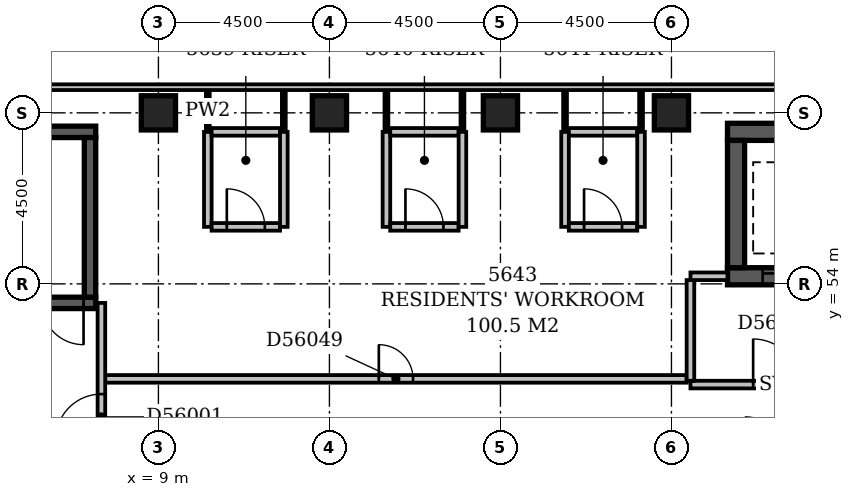
"""IFC4 building model, lengths in metres.
Left out: names, types, materials, properties, quantities, classifications, styles, units other than length and angle.
Written with IfcOpenShell. Run it as: python <this file> out.ifc"""

import sys

from ifc_helpers import new_model, si_unit, direction, frame, frame_2d, origin, origin_2d, place, context, subcontext, project, spatial, rectangle, extrude, element, fill, save


model = new_model("IFC4")
c1 = context("Model", 3, precision=1e-05, world=origin(), true_north=direction((0.0, 1.0)))
c2 = subcontext(c1, "Body", "Model", "MODEL_VIEW")
j1 = project(units=[si_unit("LENGTHUNIT", "METRE"), si_unit("PLANEANGLEUNIT", "RADIAN")], contexts=[c1])
p1 = place(None, origin())
s1 = spatial("IfcSite", under=j1, at=p1, CompositionType="ELEMENT")
p2 = place(p1, origin())
s2 = spatial("IfcBuilding", under=s1, at=p2, CompositionType="ELEMENT")
p3 = place(p2, frame((0.0, 0.0, 218.6)))
s3 = spatial("IfcBuildingStorey", under=s2, at=p3, CompositionType="ELEMENT", Elevation=218.6)
p4 = place(p3, frame((0.35, 53.5, -0.3), z_axis=(0.0, 0.0, 1.0), x_axis=(1.0, 0.0, 0.0)))
e1 = element("IfcWall", 1, at=p4, inside=s3, PredefinedType="SHEAR", context=c2, shape_type="SweptSolid", body=[
    extrude(rectangle(XDim=7.0, YDim=0.3, at=frame_2d((3.5, 0.0))), origin(), (0.0, 0.0, 1.0), 3.6),
])
p5 = place(p4, frame((5.58, 0.0, 0.3)))
e2 = element("IfcOpeningElement", 2, at=p5, cuts=e1, PredefinedType="OPENING", context=c2, shape_type="SweptSolid", body=[
    extrude(rectangle(XDim=1.1, YDim=2.1, at=frame_2d((0.55, 1.05))), frame((0.0, 0.162, 0.0), z_axis=(0.0, -1.0, 0.0), x_axis=(1.0, 0.0, 0.0)), (0.0, 0.0, 1.0), 0.324),
])
p6 = place(p3, frame((0.35, 58.0, -0.3), z_axis=(0.0, 0.0, 1.0), x_axis=(1.0, 0.0, 0.0)))
e3 = element("IfcWall", 3, at=p6, inside=s3, PredefinedType="SHEAR", context=c2, shape_type="SweptSolid", body=[
    extrude(rectangle(XDim=7.0, YDim=0.3, at=frame_2d((3.5, 0.0))), origin(), (0.0, 0.0, 1.0), 3.6),
])
p7 = place(p3, frame((7.2, 53.65, -0.3), z_axis=(0.0, 0.0, 1.0), x_axis=(0.0, 1.0, 0.0)))
e4 = element("IfcWall", 4, at=p7, inside=s3, PredefinedType="SHEAR", context=c2, shape_type="SweptSolid", body=[
    extrude(rectangle(XDim=4.2, YDim=0.3, at=frame_2d((2.1, 0.0))), origin(), (0.0, 0.0, 1.0), 3.6),
])
p8 = place(p3, frame((23.975, 54.2, -0.3), z_axis=(0.0, 0.0, 1.0), x_axis=(1.0, 0.0, 0.0)))
e5 = element("IfcWall", 5, at=p8, inside=s3, PredefinedType="SHEAR", context=c2, shape_type="SweptSolid", body=[
    extrude(rectangle(XDim=2.95, YDim=0.45, at=frame_2d((1.475, 0.0))), origin(), (0.0, 0.0, 1.0), 3.6),
])
p9 = place(p8, frame((0.925, 0.0, 0.3)))
e6 = element("IfcOpeningElement", 6, at=p9, cuts=e5, PredefinedType="OPENING", context=c2, shape_type="SweptSolid", body=[
    extrude(rectangle(XDim=1.1, YDim=2.1, at=frame_2d((0.55, 1.05))), frame((0.0, 0.237, 0.0), z_axis=(0.0, -1.0, 0.0), x_axis=(1.0, 0.0, 0.0)), (0.0, 0.0, 1.0), 0.474),
])
p10 = place(p3, frame((23.975, 58.0, -0.3), z_axis=(0.0, 0.0, 1.0), x_axis=(1.0, 0.0, 0.0)))
e7 = element("IfcWall", 7, at=p10, inside=s3, PredefinedType="SHEAR", context=c2, shape_type="SweptSolid", body=[
    extrude(rectangle(XDim=2.95, YDim=0.45, at=frame_2d((1.475, 0.0))), origin(), (0.0, 0.0, 1.0), 3.6),
])
p11 = place(p3, frame((24.2, 54.425, -0.3), z_axis=(0.0, 0.0, 1.0), x_axis=(0.0, 1.0, 0.0)))
e8 = element("IfcWall", 8, at=p11, inside=s3, PredefinedType="SHEAR", context=c2, shape_type="SweptSolid", body=[
    extrude(rectangle(XDim=3.35, YDim=0.45, at=frame_2d((1.675, 0.0))), origin(), (0.0, 0.0, 1.0), 3.6),
])
for number, where, z_axis, x_axis in (
    (9, (9.0, 58.5, -0.3), (0.0, 0.0, 1.0), (1.0, 0.0, 0.0)),
    (10, (13.5, 58.5, -0.3), (0.0, 0.0, 1.0), (1.0, 0.0, 0.0)),
    (11, (18.0, 58.5, -0.3), (0.0, 0.0, 1.0), (1.0, 0.0, 0.0)),
    (12, (22.5, 58.5, -0.3), (0.0, 0.0, 1.0), (1.0, 0.0, 0.0)),
):
    element("IfcColumn", number, at=place(p3, frame(where, z_axis=z_axis, x_axis=x_axis)), inside=s3, PredefinedType="COLUMN", context=c2, shape_type="SweptSolid", body=[
        extrude(rectangle(XDim=0.9, YDim=0.9, at=origin_2d()), origin(), (0.0, 0.0, 1.0), 3.6),
    ])
p12 = place(p3, frame((50.1, 59.175, 0.0), z_axis=(0.0, 0.0, 1.0), x_axis=(-1.0, 0.0, 0.0)))
e13 = element("IfcWall", 13, at=p12, inside=s3, PredefinedType="STANDARD", context=c2, shape_type="SweptSolid", body=[
    extrude(rectangle(XDim=50.85, YDim=0.15, at=frame_2d((25.425, 0.0))), origin(), (0.0, 0.0, 1.0), 2.7),
])
p13 = place(p12, frame((20.857, 0.0, 0.6)))
e14 = element("IfcOpeningElement", 14, at=p13, cuts=e13, PredefinedType="OPENING", context=c2, shape_type="SweptSolid", body=[
    extrude(rectangle(XDim=1.5, YDim=1.8, at=frame_2d((0.75, 0.9))), frame((0.0, 0.087, 0.0), z_axis=(0.0, -1.0, 0.0), x_axis=(1.0, 0.0, 0.0)), (0.0, 0.0, 1.0), 0.174),
])
p14 = place(p3, frame((23.0, 51.35, 0.0), z_axis=(0.0, 0.0, 1.0), x_axis=(1.0, 0.0, 0.0)))
e15 = element("IfcWall", 15, at=p14, inside=s3, PredefinedType="PARTITIONING", context=c2, shape_type="SweptSolid", body=[
    extrude(rectangle(XDim=4.8, YDim=0.2, at=frame_2d((2.4, 0.0))), origin(), (0.0, 0.0, 1.0), 3.3),
])
p15 = place(p14, frame((1.65, 0.0, 0.0)))
e16 = element("IfcOpeningElement", 16, at=p15, cuts=e15, PredefinedType="OPENING", context=c2, shape_type="SweptSolid", body=[
    extrude(rectangle(XDim=1.2, YDim=2.1, at=frame_2d((0.6, 1.05))), frame((0.0, 0.112, 0.0), z_axis=(0.0, -1.0, 0.0), x_axis=(1.0, 0.0, 0.0)), (0.0, 0.0, 1.0), 0.224),
])
p16 = place(p3, frame((23.0, 54.2, 0.0), z_axis=(0.0, 0.0, 1.0), x_axis=(1.0, 0.0, 0.0)))
e17 = element("IfcWall", 17, at=p16, inside=s3, PredefinedType="PARTITIONING", context=c2, shape_type="SweptSolid", body=[
    extrude(rectangle(XDim=0.975, YDim=0.2, at=frame_2d((0.488, 0.0))), origin(), (0.0, 0.0, 1.0), 3.3),
])
p17 = place(p3, frame((23.0, 51.45, 0.0), z_axis=(0.0, 0.0, 1.0), x_axis=(0.0, 1.0, 0.0)))
e18 = element("IfcWall", 18, at=p17, inside=s3, PredefinedType="PARTITIONING", context=c2, shape_type="SweptSolid", body=[
    extrude(rectangle(XDim=2.65, YDim=0.2, at=frame_2d((1.325, 0.0))), origin(), (0.0, 0.0, 1.0), 3.3),
])
p18 = place(p3, frame((7.5, 49.6, 0.0), z_axis=(0.0, 0.0, 1.0), x_axis=(0.0, 1.0, 0.0)))
e19 = element("IfcWall", 19, at=p18, inside=s3, PredefinedType="PARTITIONING", context=c2, shape_type="SweptSolid", body=[
    extrude(rectangle(XDim=3.9, YDim=0.2, at=frame_2d((1.95, 0.0))), origin(), (0.0, 0.0, 1.0), 3.3),
])
p19 = place(p18, frame((0.3, 0.0, 0.0)))
e20 = element("IfcOpeningElement", 20, at=p19, cuts=e19, PredefinedType="OPENING", context=c2, shape_type="SweptSolid", body=[
    extrude(rectangle(XDim=1.2, YDim=2.1, at=frame_2d((0.6, 1.05))), frame((0.0, 0.112, 0.0), z_axis=(0.0, -1.0, 0.0), x_axis=(1.0, 0.0, 0.0)), (0.0, 0.0, 1.0), 0.224),
])
p20 = place(p3, frame((7.6, 51.5, 0.0), z_axis=(0.0, 0.0, 1.0), x_axis=(1.0, 0.0, 0.0)))
e21 = element("IfcWall", 21, at=p20, inside=s3, PredefinedType="PARTITIONING", context=c2, shape_type="SweptSolid", body=[
    extrude(rectangle(XDim=15.3, YDim=0.2, at=frame_2d((7.65, 0.0))), origin(), (0.0, 0.0, 1.0), 3.3),
])
p21 = place(p20, frame((7.2, 0.0, 0.0)))
e22 = element("IfcOpeningElement", 22, at=p21, cuts=e21, PredefinedType="OPENING", context=c2, shape_type="SweptSolid", body=[
    extrude(rectangle(XDim=0.9, YDim=2.1, at=frame_2d((0.45, 1.05))), frame((0.0, 0.112, 0.0), z_axis=(0.0, -1.0, 0.0), x_axis=(1.0, 0.0, 0.0)), (0.0, 0.0, 1.0), 0.224),
])
p22 = place(p3, frame((10.3, 55.5, 0.0), z_axis=(0.0, 0.0, 1.0), x_axis=(0.0, 1.0, 0.0)))
e23 = element("IfcWall", 23, at=p22, inside=s3, PredefinedType="PARTITIONING", context=c2, shape_type="SweptSolid", body=[
    extrude(rectangle(XDim=2.5, YDim=0.2, at=frame_2d((1.25, 0.0))), origin(), (0.0, 0.0, 1.0), 3.3),
])
p23 = place(p3, frame((10.4, 55.5, 0.0), z_axis=(0.0, 0.0, 1.0), x_axis=(1.0, 0.0, 0.0)))
e24 = element("IfcWall", 24, at=p23, inside=s3, PredefinedType="PARTITIONING", context=c2, shape_type="SweptSolid", body=[
    extrude(rectangle(XDim=1.8, YDim=0.2, at=frame_2d((0.9, 0.0))), origin(), (0.0, 0.0, 1.0), 3.3),
])
p24 = place(p23, frame((0.4, 0.0, 0.0)))
e25 = element("IfcOpeningElement", 25, at=p24, cuts=e24, PredefinedType="OPENING", context=c2, shape_type="SweptSolid", body=[
    extrude(rectangle(XDim=1.0, YDim=2.1, at=frame_2d((0.5, 1.05))), frame((0.0, 0.112, 0.0), z_axis=(0.0, -1.0, 0.0), x_axis=(1.0, 0.0, 0.0)), (0.0, 0.0, 1.0), 0.224),
])
for number, where, z_axis, x_axis in (
    (26, (12.3, 55.5, 0.0), (0.0, 0.0, 1.0), (0.0, 1.0, 0.0)),
    (27, (15.0, 55.5, 0.0), (0.0, 0.0, 1.0), (0.0, 1.0, 0.0)),
):
    element("IfcWall", number, at=place(p3, frame(where, z_axis=z_axis, x_axis=x_axis)), inside=s3, PredefinedType="PARTITIONING", context=c2, shape_type="SweptSolid", body=[
        extrude(rectangle(XDim=2.5, YDim=0.2, at=frame_2d((1.25, 0.0))), origin(), (0.0, 0.0, 1.0), 3.3),
    ])
p25 = place(p3, frame((15.1, 55.5, 0.0), z_axis=(0.0, 0.0, 1.0), x_axis=(1.0, 0.0, 0.0)))
e28 = element("IfcWall", 28, at=p25, inside=s3, PredefinedType="PARTITIONING", context=c2, shape_type="SweptSolid", body=[
    extrude(rectangle(XDim=1.8, YDim=0.2, at=frame_2d((0.9, 0.0))), origin(), (0.0, 0.0, 1.0), 3.3),
])
p26 = place(p25, frame((0.4, 0.0, 0.0)))
e29 = element("IfcOpeningElement", 29, at=p26, cuts=e28, PredefinedType="OPENING", context=c2, shape_type="SweptSolid", body=[
    extrude(rectangle(XDim=1.0, YDim=2.1, at=frame_2d((0.5, 1.05))), frame((0.0, 0.112, 0.0), z_axis=(0.0, -1.0, 0.0), x_axis=(1.0, 0.0, 0.0)), (0.0, 0.0, 1.0), 0.224),
])
for number, where, z_axis, x_axis in (
    (30, (17.0, 55.5, 0.0), (0.0, 0.0, 1.0), (0.0, 1.0, 0.0)),
    (31, (19.7, 55.5, 0.0), (0.0, 0.0, 1.0), (0.0, 1.0, 0.0)),
):
    element("IfcWall", number, at=place(p3, frame(where, z_axis=z_axis, x_axis=x_axis)), inside=s3, PredefinedType="PARTITIONING", context=c2, shape_type="SweptSolid", body=[
        extrude(rectangle(XDim=2.5, YDim=0.2, at=frame_2d((1.25, 0.0))), origin(), (0.0, 0.0, 1.0), 3.3),
    ])
p27 = place(p3, frame((19.8, 55.5, 0.0), z_axis=(0.0, 0.0, 1.0), x_axis=(1.0, 0.0, 0.0)))
e32 = element("IfcWall", 32, at=p27, inside=s3, PredefinedType="PARTITIONING", context=c2, shape_type="SweptSolid", body=[
    extrude(rectangle(XDim=1.8, YDim=0.2, at=frame_2d((0.9, 0.0))), origin(), (0.0, 0.0, 1.0), 3.3),
])
p28 = place(p27, frame((0.4, 0.0, 0.0)))
e33 = element("IfcOpeningElement", 33, at=p28, cuts=e32, PredefinedType="OPENING", context=c2, shape_type="SweptSolid", body=[
    extrude(rectangle(XDim=1.0, YDim=2.1, at=frame_2d((0.5, 1.05))), frame((0.0, 0.112, 0.0), z_axis=(0.0, -1.0, 0.0), x_axis=(1.0, 0.0, 0.0)), (0.0, 0.0, 1.0), 0.224),
])
p29 = place(p3, frame((21.7, 55.5, 0.0), z_axis=(0.0, 0.0, 1.0), x_axis=(0.0, 1.0, 0.0)))
e34 = element("IfcWall", 34, at=p29, inside=s3, PredefinedType="PARTITIONING", context=c2, shape_type="SweptSolid", body=[
    extrude(rectangle(XDim=2.5, YDim=0.2, at=frame_2d((1.25, 0.0))), origin(), (0.0, 0.0, 1.0), 3.3),
])
p30 = place(p3, frame((10.3, 58.0, 0.0), z_axis=(0.0, 0.0, 1.0), x_axis=(0.0, 1.0, 0.0)))
e35 = element("IfcWall", 35, at=p30, inside=s3, PredefinedType="PARTITIONING", context=c2, shape_type="SweptSolid", body=[
    extrude(rectangle(XDim=1.1, YDim=0.1, at=frame_2d((0.55, 0.0))), origin(), (0.0, 0.0, 1.0), 3.3),
])
p31 = place(p3, frame((10.4, 58.0, 0.0), z_axis=(0.0, 0.0, 1.0), x_axis=(1.0, 0.0, 0.0)))
e36 = element("IfcWall", 36, at=p31, inside=s3, PredefinedType="PARTITIONING", context=c2, shape_type="SweptSolid", body=[
    extrude(rectangle(XDim=1.8, YDim=0.2, at=frame_2d((0.9, 0.0))), origin(), (0.0, 0.0, 1.0), 3.3),
])
for number, where, z_axis, x_axis in (
    (37, (12.3, 58.0, 0.0), (0.0, 0.0, 1.0), (0.0, 1.0, 0.0)),
    (38, (15.0, 58.0, 0.0), (0.0, 0.0, 1.0), (0.0, 1.0, 0.0)),
):
    element("IfcWall", number, at=place(p3, frame(where, z_axis=z_axis, x_axis=x_axis)), inside=s3, PredefinedType="PARTITIONING", context=c2, shape_type="SweptSolid", body=[
        extrude(rectangle(XDim=1.1, YDim=0.1, at=frame_2d((0.55, 0.0))), origin(), (0.0, 0.0, 1.0), 3.3),
    ])
p32 = place(p3, frame((15.1, 58.0, 0.0), z_axis=(0.0, 0.0, 1.0), x_axis=(1.0, 0.0, 0.0)))
e39 = element("IfcWall", 39, at=p32, inside=s3, PredefinedType="PARTITIONING", context=c2, shape_type="SweptSolid", body=[
    extrude(rectangle(XDim=1.8, YDim=0.2, at=frame_2d((0.9, 0.0))), origin(), (0.0, 0.0, 1.0), 3.3),
])
for number, where, z_axis, x_axis in (
    (40, (17.0, 58.0, 0.0), (0.0, 0.0, 1.0), (0.0, 1.0, 0.0)),
    (41, (19.7, 58.0, 0.0), (0.0, 0.0, 1.0), (0.0, 1.0, 0.0)),
):
    element("IfcWall", number, at=place(p3, frame(where, z_axis=z_axis, x_axis=x_axis)), inside=s3, PredefinedType="PARTITIONING", context=c2, shape_type="SweptSolid", body=[
        extrude(rectangle(XDim=1.1, YDim=0.1, at=frame_2d((0.55, 0.0))), origin(), (0.0, 0.0, 1.0), 3.3),
    ])
p33 = place(p3, frame((19.8, 58.0, 0.0), z_axis=(0.0, 0.0, 1.0), x_axis=(1.0, 0.0, 0.0)))
e42 = element("IfcWall", 42, at=p33, inside=s3, PredefinedType="PARTITIONING", context=c2, shape_type="SweptSolid", body=[
    extrude(rectangle(XDim=1.8, YDim=0.2, at=frame_2d((0.9, 0.0))), origin(), (0.0, 0.0, 1.0), 3.3),
])
p34 = place(p3, frame((21.7, 58.0, 0.0), z_axis=(0.0, 0.0, 1.0), x_axis=(0.0, 1.0, 0.0)))
e43 = element("IfcWall", 43, at=p34, inside=s3, PredefinedType="PARTITIONING", context=c2, shape_type="SweptSolid", body=[
    extrude(rectangle(XDim=1.1, YDim=0.1, at=frame_2d((0.55, 0.0))), origin(), (0.0, 0.0, 1.0), 3.3),
])
p35 = place(p19, origin())
e44 = element("IfcDoor", 44, at=p35, inside=s3, OperationType="SINGLE_SWING_LEFT", PredefinedType="DOOR", context=c2, shape_type="SweptSolid", body=[
    extrude(rectangle(XDim=1.2, YDim=2.1, at=frame_2d((0.6, 1.05))), frame((0.0, 0.025, 0.0), z_axis=(0.0, -1.0, 0.0), x_axis=(1.0, 0.0, 0.0)), (0.0, 0.0, 1.0), 0.05),
])
fill(e20, e44)
p36 = place(p15, origin())
e45 = element("IfcDoor", 45, at=p36, inside=s3, OperationType="SINGLE_SWING_LEFT", PredefinedType="DOOR", context=c2, shape_type="SweptSolid", body=[
    extrude(rectangle(XDim=1.2, YDim=2.1, at=frame_2d((0.6, 1.05))), frame((0.0, 0.025, 0.0), z_axis=(0.0, -1.0, 0.0), x_axis=(1.0, 0.0, 0.0)), (0.0, 0.0, 1.0), 0.05),
])
fill(e16, e45)
p37 = place(p9, origin())
e46 = element("IfcDoor", 46, at=p37, inside=s3, OperationType="SLIDING_TO_LEFT", PredefinedType="DOOR", context=c2, shape_type="SweptSolid", body=[
    extrude(rectangle(XDim=1.1, YDim=2.1, at=frame_2d((0.55, 1.05))), frame((0.0, 0.025, 0.0), z_axis=(0.0, -1.0, 0.0), x_axis=(1.0, 0.0, 0.0)), (0.0, 0.0, 1.0), 0.05),
])
fill(e6, e46)
p38 = place(p5, origin())
e47 = element("IfcDoor", 47, at=p38, inside=s3, OperationType="SINGLE_SWING_RIGHT", PredefinedType="DOOR", context=c2, shape_type="SweptSolid", body=[
    extrude(rectangle(XDim=1.1, YDim=2.1, at=frame_2d((0.55, 1.05))), frame((0.0, 0.025, 0.0), z_axis=(0.0, -1.0, 0.0), x_axis=(1.0, 0.0, 0.0)), (0.0, 0.0, 1.0), 0.05),
])
fill(e2, e47)
p39 = place(p21, origin())
e48 = element("IfcDoor", 48, at=p39, inside=s3, OperationType="SINGLE_SWING_LEFT", PredefinedType="DOOR", context=c2, shape_type="SweptSolid", body=[
    extrude(rectangle(XDim=0.9, YDim=2.1, at=frame_2d((0.45, 1.05))), frame((0.0, 0.025, 0.0), z_axis=(0.0, -1.0, 0.0), x_axis=(1.0, 0.0, 0.0)), (0.0, 0.0, 1.0), 0.05),
])
fill(e22, e48)
p40 = place(p24, origin())
e49 = element("IfcDoor", 49, at=p40, inside=s3, OperationType="SINGLE_SWING_LEFT", PredefinedType="DOOR", context=c2, shape_type="SweptSolid", body=[
    extrude(rectangle(XDim=1.0, YDim=2.1, at=frame_2d((0.5, 1.05))), frame((0.0, 0.025, 0.0), z_axis=(0.0, -1.0, 0.0), x_axis=(1.0, 0.0, 0.0)), (0.0, 0.0, 1.0), 0.05),
])
fill(e25, e49)
p41 = place(p26, origin())
e50 = element("IfcDoor", 50, at=p41, inside=s3, OperationType="SINGLE_SWING_LEFT", PredefinedType="DOOR", context=c2, shape_type="SweptSolid", body=[
    extrude(rectangle(XDim=1.0, YDim=2.1, at=frame_2d((0.5, 1.05))), frame((0.0, 0.025, 0.0), z_axis=(0.0, -1.0, 0.0), x_axis=(1.0, 0.0, 0.0)), (0.0, 0.0, 1.0), 0.05),
])
fill(e29, e50)
p42 = place(p28, origin())
e51 = element("IfcDoor", 51, at=p42, inside=s3, OperationType="SINGLE_SWING_LEFT", PredefinedType="DOOR", context=c2, shape_type="SweptSolid", body=[
    extrude(rectangle(XDim=1.0, YDim=2.1, at=frame_2d((0.5, 1.05))), frame((0.0, 0.025, 0.0), z_axis=(0.0, -1.0, 0.0), x_axis=(1.0, 0.0, 0.0)), (0.0, 0.0, 1.0), 0.05),
])
fill(e33, e51)
save(model, sys.argv[1])
